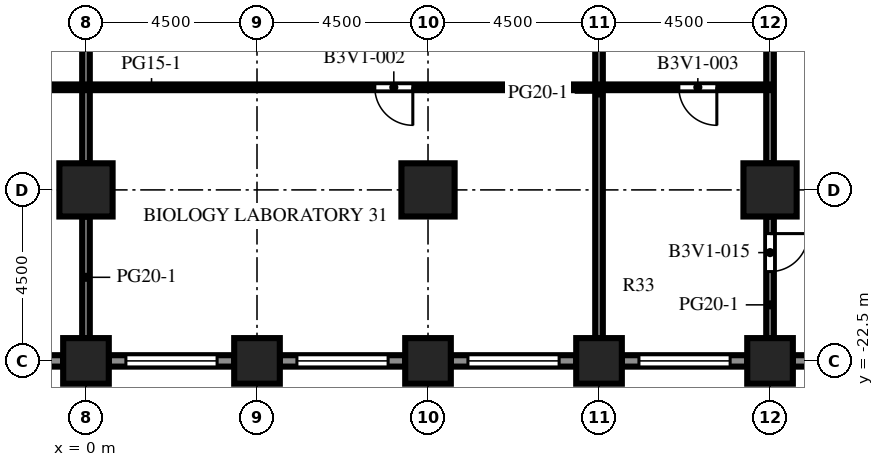
"""IFC4 building model, lengths in metres.
Left out: names, types, materials, properties, quantities, classifications, styles, units other than length and angle.
Written with IfcOpenShell. Run it as: python <this file> out.ifc"""

import sys

from ifc_helpers import new_model, si_unit, direction, frame, frame_2d, origin, origin_2d, place, context, subcontext, project, spatial, rectangle, extrude, element, fill, save


model = new_model("IFC4")
c1 = context("Model", 3, precision=1e-05, world=origin(), true_north=direction((0.0, 1.0)))
c2 = subcontext(c1, "Body", "Model", "MODEL_VIEW")
j1 = project(units=[si_unit("LENGTHUNIT", "METRE"), si_unit("PLANEANGLEUNIT", "RADIAN")], contexts=[c1])
p1 = place(None, origin())
s1 = spatial("IfcSite", under=j1, at=p1, CompositionType="ELEMENT")
p2 = place(p1, origin())
s2 = spatial("IfcBuilding", under=s1, at=p2, CompositionType="ELEMENT")
p3 = place(p2, frame((0.0, 0.0, 86.1)))
s3 = spatial("IfcBuildingStorey", under=s2, at=p3, CompositionType="ELEMENT", Elevation=86.1)
for number, where, z_axis, x_axis in (
    (1, (0.0, -22.5, 0.0), (0.0, 0.0, 1.0), (1.0, 0.0, 0.0)),
    (2, (4.5, -22.5, 0.0), (0.0, 0.0, 1.0), (1.0, 0.0, 0.0)),
    (3, (9.0, -22.5, 0.0), (0.0, 0.0, 1.0), (1.0, 0.0, 0.0)),
    (4, (13.5, -22.5, 0.0), (0.0, 0.0, 1.0), (1.0, 0.0, 0.0)),
    (5, (18.0, -22.5, 0.0), (0.0, 0.0, 1.0), (1.0, 0.0, 0.0)),
):
    element("IfcColumn", number, at=place(p3, frame(where, z_axis=z_axis, x_axis=x_axis)), inside=s3, PredefinedType="COLUMN", context=c2, shape_type="SweptSolid", body=[
        extrude(rectangle(XDim=1.2, YDim=1.2, at=origin_2d()), origin(), (0.0, 0.0, 1.0), 4.1),
    ])
for number, where, z_axis, x_axis in (
    (6, (0.0, -18.0, 0.0), (0.0, 0.0, 1.0), (1.0, 0.0, 0.0)),
    (7, (9.0, -18.0, 0.0), (0.0, 0.0, 1.0), (1.0, 0.0, 0.0)),
    (8, (18.0, -18.0, 0.0), (0.0, 0.0, 1.0), (1.0, 0.0, 0.0)),
):
    element("IfcColumn", number, at=place(p3, frame(where, z_axis=z_axis, x_axis=x_axis)), inside=s3, PredefinedType="COLUMN", context=c2, shape_type="SweptSolid", body=[
        extrude(rectangle(XDim=1.4, YDim=1.4, at=origin_2d()), origin(), (0.0, 0.0, 1.0), 4.1),
    ])
p4 = place(p3, frame((-0.6, -22.5, 0.0), z_axis=(0.0, 0.0, 1.0), x_axis=(-1.0, 0.0, 0.0)))
e9 = element("IfcWall", 9, at=p4, inside=s3, PredefinedType="SOLIDWALL", context=c2, shape_type="SweptSolid", body=[
    extrude(rectangle(XDim=3.3, YDim=0.3, at=frame_2d((1.65, 0.0))), origin(), (0.0, 0.0, 1.0), 2.75),
])
p5 = place(p4, frame((0.45, 0.0, 0.8)))
e10 = element("IfcOpeningElement", 10, at=p5, cuts=e9, PredefinedType="OPENING", context=c2, shape_type="SweptSolid", body=[
    extrude(rectangle(XDim=2.4, YDim=1.7, at=frame_2d((1.2, 0.85))), frame((0.0, 0.16, 0.0), z_axis=(0.0, -1.0, 0.0), x_axis=(1.0, 0.0, 0.0)), (0.0, 0.0, 1.0), 0.32),
])
p6 = place(p3, frame((3.9, -22.5, 0.0), z_axis=(0.0, 0.0, 1.0), x_axis=(-1.0, 0.0, 0.0)))
e11 = element("IfcWall", 11, at=p6, inside=s3, PredefinedType="SOLIDWALL", context=c2, shape_type="SweptSolid", body=[
    extrude(rectangle(XDim=3.3, YDim=0.3, at=frame_2d((1.65, 0.0))), origin(), (0.0, 0.0, 1.0), 2.75),
])
p7 = place(p6, frame((0.45, 0.0, 0.8)))
e12 = element("IfcOpeningElement", 12, at=p7, cuts=e11, PredefinedType="OPENING", context=c2, shape_type="SweptSolid", body=[
    extrude(rectangle(XDim=2.4, YDim=1.7, at=frame_2d((1.2, 0.85))), frame((0.0, 0.16, 0.0), z_axis=(0.0, -1.0, 0.0), x_axis=(1.0, 0.0, 0.0)), (0.0, 0.0, 1.0), 0.32),
])
p8 = place(p3, frame((8.4, -22.5, 0.0), z_axis=(0.0, 0.0, 1.0), x_axis=(-1.0, 0.0, 0.0)))
e13 = element("IfcWall", 13, at=p8, inside=s3, PredefinedType="SOLIDWALL", context=c2, shape_type="SweptSolid", body=[
    extrude(rectangle(XDim=3.3, YDim=0.3, at=frame_2d((1.65, 0.0))), origin(), (0.0, 0.0, 1.0), 2.75),
])
p9 = place(p8, frame((0.45, 0.0, 0.8)))
e14 = element("IfcOpeningElement", 14, at=p9, cuts=e13, PredefinedType="OPENING", context=c2, shape_type="SweptSolid", body=[
    extrude(rectangle(XDim=2.4, YDim=1.7, at=frame_2d((1.2, 0.85))), frame((0.0, 0.16, 0.0), z_axis=(0.0, -1.0, 0.0), x_axis=(1.0, 0.0, 0.0)), (0.0, 0.0, 1.0), 0.32),
])
p10 = place(p3, frame((12.9, -22.5, 0.0), z_axis=(0.0, 0.0, 1.0), x_axis=(-1.0, 0.0, 0.0)))
e15 = element("IfcWall", 15, at=p10, inside=s3, PredefinedType="SOLIDWALL", context=c2, shape_type="SweptSolid", body=[
    extrude(rectangle(XDim=3.3, YDim=0.3, at=frame_2d((1.65, 0.0))), origin(), (0.0, 0.0, 1.0), 2.75),
])
p11 = place(p10, frame((0.45, 0.0, 0.8)))
e16 = element("IfcOpeningElement", 16, at=p11, cuts=e15, PredefinedType="OPENING", context=c2, shape_type="SweptSolid", body=[
    extrude(rectangle(XDim=2.4, YDim=1.7, at=frame_2d((1.2, 0.85))), frame((0.0, 0.16, 0.0), z_axis=(0.0, -1.0, 0.0), x_axis=(1.0, 0.0, 0.0)), (0.0, 0.0, 1.0), 0.32),
])
p12 = place(p3, frame((17.4, -22.5, 0.0), z_axis=(0.0, 0.0, 1.0), x_axis=(-1.0, 0.0, 0.0)))
e17 = element("IfcWall", 17, at=p12, inside=s3, PredefinedType="SOLIDWALL", context=c2, shape_type="SweptSolid", body=[
    extrude(rectangle(XDim=3.3, YDim=0.3, at=frame_2d((1.65, 0.0))), origin(), (0.0, 0.0, 1.0), 2.75),
])
p13 = place(p12, frame((0.45, 0.0, 0.8)))
e18 = element("IfcOpeningElement", 18, at=p13, cuts=e17, PredefinedType="OPENING", context=c2, shape_type="SweptSolid", body=[
    extrude(rectangle(XDim=2.4, YDim=1.7, at=frame_2d((1.2, 0.85))), frame((0.0, 0.16, 0.0), z_axis=(0.0, -1.0, 0.0), x_axis=(1.0, 0.0, 0.0)), (0.0, 0.0, 1.0), 0.32),
])
p14 = place(p3, frame((21.9, -22.5, 0.0), z_axis=(0.0, 0.0, 1.0), x_axis=(-1.0, 0.0, 0.0)))
e19 = element("IfcWall", 19, at=p14, inside=s3, PredefinedType="SOLIDWALL", context=c2, shape_type="SweptSolid", body=[
    extrude(rectangle(XDim=3.3, YDim=0.3, at=frame_2d((1.65, 0.0))), origin(), (0.0, 0.0, 1.0), 2.75),
])
p15 = place(p14, frame((1.15, 0.0, 0.0)))
e20 = element("IfcOpeningElement", 20, at=p15, cuts=e19, PredefinedType="OPENING", context=c2, shape_type="SweptSolid", body=[
    extrude(rectangle(XDim=1.0, YDim=2.2, at=frame_2d((0.5, 1.1))), frame((0.0, 0.16, 0.0), z_axis=(0.0, -1.0, 0.0), x_axis=(1.0, 0.0, 0.0)), (0.0, 0.0, 1.0), 0.32),
])
p16 = place(p3, frame((0.0, -21.9, 0.0), z_axis=(0.0, 0.0, 1.0), x_axis=(0.0, 1.0, 0.0)))
e21 = element("IfcWall", 21, at=p16, inside=s3, PredefinedType="PARTITIONING", context=c2, shape_type="SweptSolid", body=[
    extrude(rectangle(XDim=3.2, YDim=0.2, at=frame_2d((1.6, 0.0))), origin(), (0.0, 0.0, 1.0), 3.65),
])
p17 = place(p3, frame((0.0, -17.3, 0.0), z_axis=(0.0, 0.0, 1.0), x_axis=(0.0, 1.0, 0.0)))
e22 = element("IfcWall", 22, at=p17, inside=s3, PredefinedType="PARTITIONING", context=c2, shape_type="SweptSolid", body=[
    extrude(rectangle(XDim=8.3, YDim=0.2, at=frame_2d((4.15, 0.0))), origin(), (0.0, 0.0, 1.0), 3.65),
])
p18 = place(p3, frame((13.5, -21.9, 0.0), z_axis=(0.0, 0.0, 1.0), x_axis=(0.0, 1.0, 0.0)))
e23 = element("IfcWall", 23, at=p18, inside=s3, PredefinedType="PARTITIONING", context=c2, shape_type="SweptSolid", body=[
    extrude(rectangle(XDim=12.9, YDim=0.2, at=frame_2d((6.45, 0.0))), origin(), (0.0, 0.0, 1.0), 3.65),
])
p19 = place(p3, frame((18.0, -21.9, 0.0), z_axis=(0.0, 0.0, 1.0), x_axis=(0.0, 1.0, 0.0)))
e24 = element("IfcWall", 24, at=p19, inside=s3, PredefinedType="PARTITIONING", context=c2, shape_type="SweptSolid", body=[
    extrude(rectangle(XDim=3.2, YDim=0.2, at=frame_2d((1.6, 0.0))), origin(), (0.0, 0.0, 1.0), 3.65),
])
p20 = place(p19, frame((1.75, 0.0, 0.0)))
e25 = element("IfcOpeningElement", 25, at=p20, cuts=e24, PredefinedType="OPENING", context=c2, shape_type="SweptSolid", body=[
    extrude(rectangle(XDim=1.0, YDim=2.1, at=frame_2d((0.5, 1.05))), frame((0.0, 0.11, 0.0), z_axis=(0.0, -1.0, 0.0), x_axis=(1.0, 0.0, 0.0)), (0.0, 0.0, 1.0), 0.22),
])
p21 = place(p3, frame((18.0, -17.3, 0.0), z_axis=(0.0, 0.0, 1.0), x_axis=(0.0, 1.0, 0.0)))
e26 = element("IfcWall", 26, at=p21, inside=s3, PredefinedType="PARTITIONING", context=c2, shape_type="SweptSolid", body=[
    extrude(rectangle(XDim=8.3, YDim=0.2, at=frame_2d((4.15, 0.0))), origin(), (0.0, 0.0, 1.0), 3.65),
])
p22 = place(p3, frame((-10.5, -15.3, 0.0), z_axis=(0.0, 0.0, 1.0), x_axis=(1.0, 0.0, 0.0)))
e27 = element("IfcWall", 27, at=p22, inside=s3, PredefinedType="PARTITIONING", context=c2, shape_type="SweptSolid", body=[
    extrude(rectangle(XDim=28.5, YDim=0.15, at=frame_2d((14.25, 0.0))), origin(), (0.0, 0.0, 1.0), 3.65),
])
p23 = place(p22, frame((5.35, 0.0, 0.0)))
e28 = element("IfcOpeningElement", 28, at=p23, cuts=e27, PredefinedType="OPENING", context=c2, shape_type="SweptSolid", body=[
    extrude(rectangle(XDim=1.0, YDim=2.1, at=frame_2d((0.5, 1.05))), frame((0.0, 0.085, 0.0), z_axis=(0.0, -1.0, 0.0), x_axis=(1.0, 0.0, 0.0)), (0.0, 0.0, 1.0), 0.17),
])
p24 = place(p22, frame((18.1, 0.0, 0.0)))
e29 = element("IfcOpeningElement", 29, at=p24, cuts=e27, PredefinedType="OPENING", context=c2, shape_type="SweptSolid", body=[
    extrude(rectangle(XDim=1.0, YDim=2.1, at=frame_2d((0.5, 1.05))), frame((0.0, 0.085, 0.0), z_axis=(0.0, -1.0, 0.0), x_axis=(1.0, 0.0, 0.0)), (0.0, 0.0, 1.0), 0.17),
])
p25 = place(p22, frame((26.1, 0.0, 0.0)))
e30 = element("IfcOpeningElement", 30, at=p25, cuts=e27, PredefinedType="OPENING", context=c2, shape_type="SweptSolid", body=[
    extrude(rectangle(XDim=1.0, YDim=2.1, at=frame_2d((0.5, 1.05))), frame((0.0, 0.085, 0.0), z_axis=(0.0, -1.0, 0.0), x_axis=(1.0, 0.0, 0.0)), (0.0, 0.0, 1.0), 0.17),
])
p26 = place(p7, origin())
e31 = element("IfcWindow", 31, at=p26, inside=s3, PartitioningType="SINGLE_PANEL", PredefinedType="WINDOW", context=c2, shape_type="SweptSolid", body=[
    extrude(rectangle(XDim=2.4, YDim=1.7, at=frame_2d((1.2, 0.85))), frame((0.0, 0.03, 0.0), z_axis=(0.0, -1.0, 0.0), x_axis=(1.0, 0.0, 0.0)), (0.0, 0.0, 1.0), 0.06),
])
fill(e12, e31)
p27 = place(p9, origin())
e32 = element("IfcWindow", 32, at=p27, inside=s3, PartitioningType="SINGLE_PANEL", PredefinedType="WINDOW", context=c2, shape_type="SweptSolid", body=[
    extrude(rectangle(XDim=2.4, YDim=1.7, at=frame_2d((1.2, 0.85))), frame((0.0, 0.03, 0.0), z_axis=(0.0, -1.0, 0.0), x_axis=(1.0, 0.0, 0.0)), (0.0, 0.0, 1.0), 0.06),
])
fill(e14, e32)
p28 = place(p11, origin())
e33 = element("IfcWindow", 33, at=p28, inside=s3, PartitioningType="SINGLE_PANEL", PredefinedType="WINDOW", context=c2, shape_type="SweptSolid", body=[
    extrude(rectangle(XDim=2.4, YDim=1.7, at=frame_2d((1.2, 0.85))), frame((0.0, 0.03, 0.0), z_axis=(0.0, -1.0, 0.0), x_axis=(1.0, 0.0, 0.0)), (0.0, 0.0, 1.0), 0.06),
])
fill(e16, e33)
p29 = place(p13, origin())
e34 = element("IfcWindow", 34, at=p29, inside=s3, PartitioningType="SINGLE_PANEL", PredefinedType="WINDOW", context=c2, shape_type="SweptSolid", body=[
    extrude(rectangle(XDim=2.4, YDim=1.7, at=frame_2d((1.2, 0.85))), frame((0.0, 0.03, 0.0), z_axis=(0.0, -1.0, 0.0), x_axis=(1.0, 0.0, 0.0)), (0.0, 0.0, 1.0), 0.06),
])
fill(e18, e34)
p30 = place(p24, origin())
e35 = element("IfcDoor", 35, at=p30, inside=s3, OperationType="SINGLE_SWING_RIGHT", PredefinedType="DOOR", context=c2, shape_type="SweptSolid", body=[
    extrude(rectangle(XDim=1.0, YDim=2.1, at=frame_2d((0.5, 1.05))), frame((0.0, 0.025, 0.0), z_axis=(0.0, -1.0, 0.0), x_axis=(1.0, 0.0, 0.0)), (0.0, 0.0, 1.0), 0.05),
])
fill(e29, e35)
p31 = place(p25, origin())
e36 = element("IfcDoor", 36, at=p31, inside=s3, OperationType="SINGLE_SWING_RIGHT", PredefinedType="DOOR", context=c2, shape_type="SweptSolid", body=[
    extrude(rectangle(XDim=1.0, YDim=2.1, at=frame_2d((0.5, 1.05))), frame((0.0, 0.025, 0.0), z_axis=(0.0, -1.0, 0.0), x_axis=(1.0, 0.0, 0.0)), (0.0, 0.0, 1.0), 0.05),
])
fill(e30, e36)
p32 = place(p20, origin())
e37 = element("IfcDoor", 37, at=p32, inside=s3, OperationType="SINGLE_SWING_RIGHT", PredefinedType="DOOR", context=c2, shape_type="SweptSolid", body=[
    extrude(rectangle(XDim=1.0, YDim=2.1, at=frame_2d((0.5, 1.05))), frame((0.0, 0.025, 0.0), z_axis=(0.0, -1.0, 0.0), x_axis=(1.0, 0.0, 0.0)), (0.0, 0.0, 1.0), 0.05),
])
fill(e25, e37)
save(model, sys.argv[1])
